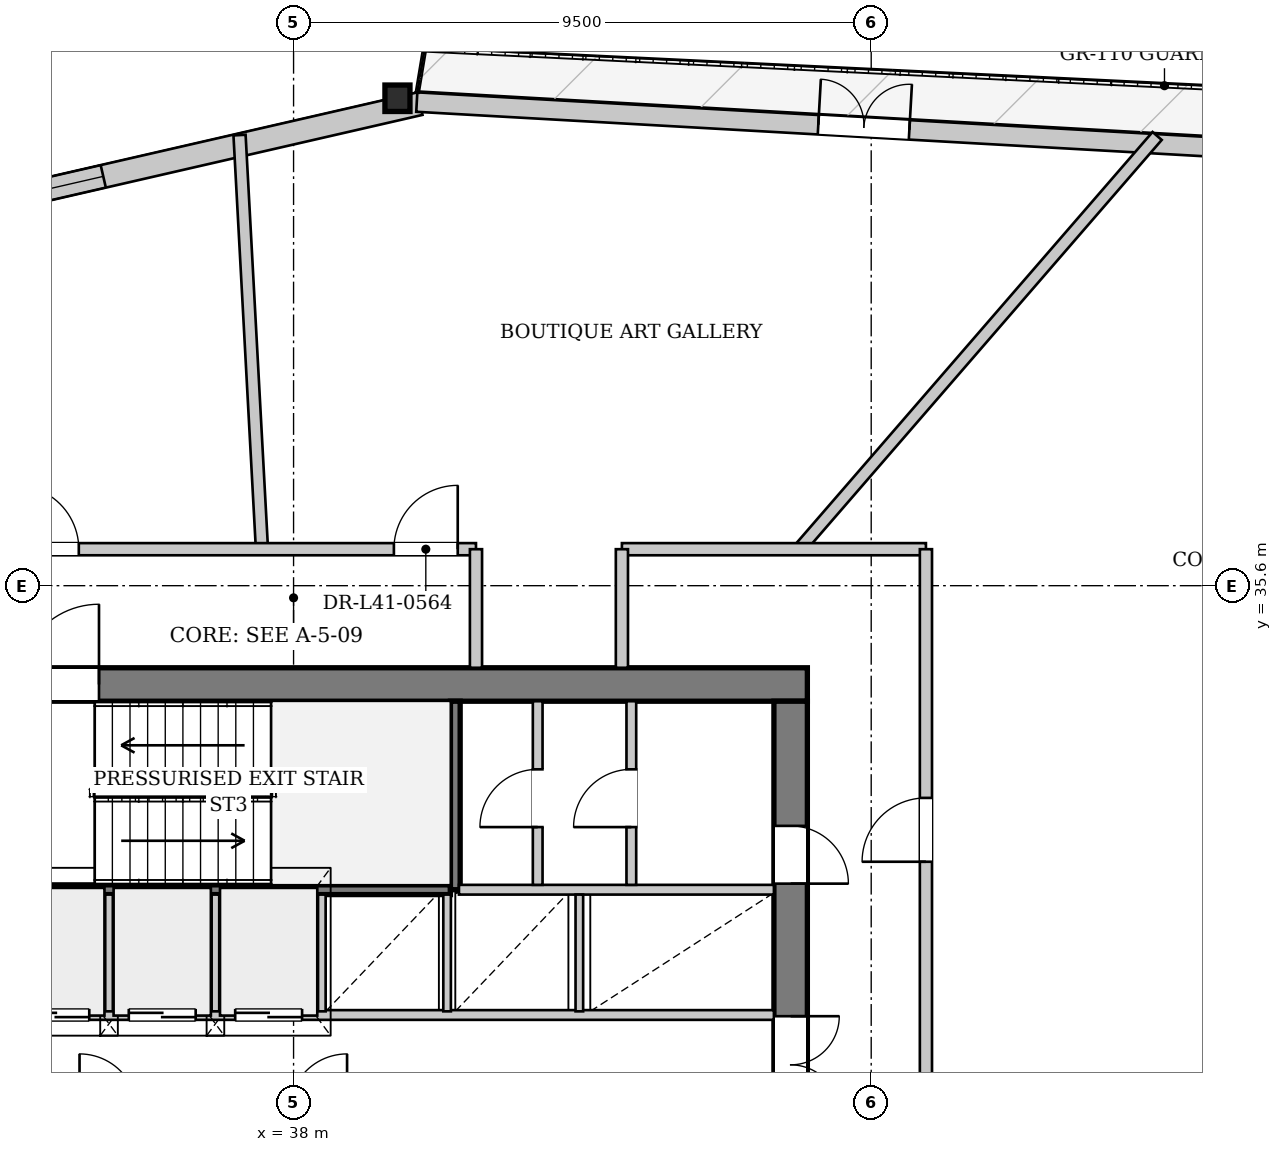
"""IFC4 building model, lengths in metres.
Left out: names, types, materials, properties, quantities, classifications, styles, units other than length and angle.
Written with IfcOpenShell. Run it as: python <this file> out.ifc"""

import sys

from ifc_helpers import new_model, si_unit, direction, frame, frame_2d, origin, origin_2d, place, context, subcontext, project, spatial, rectangle, i_section, extrude, source, transform, mapped, element, fill, save


model = new_model("IFC4")
c1 = context("Model", 3, precision=1e-05, world=origin(), true_north=direction((0.0, 1.0)))
c2 = subcontext(c1, "Body", "Model", "MODEL_VIEW")
j1 = project(units=[si_unit("LENGTHUNIT", "METRE"), si_unit("PLANEANGLEUNIT", "RADIAN")], contexts=[c1])
p1 = place(None, origin())
s1 = spatial("IfcSite", under=j1, at=p1, CompositionType="ELEMENT")
p2 = place(p1, origin())
s2 = spatial("IfcBuilding", under=s1, at=p2, CompositionType="ELEMENT")
p3 = place(p2, frame((0.0, 0.0, 157.25)))
s3 = spatial("IfcBuildingStorey", under=s2, at=p3, CompositionType="ELEMENT", Elevation=157.25)
m1 = source(origin(), c2, "Body", "SweptSolid", [
    extrude(i_section(OverallWidth=0.412, OverallDepth=0.435, WebThickness=0.031, FlangeThickness=0.05, at=origin_2d()), origin(), (0.0, 0.0, 1.0), 3.453),
])
p4 = place(p3, frame((40.035, 43.713, 0.0), z_axis=(-0.189343347232, -0.056209096733, 0.980300787668), x_axis=(0.284588007849, -0.958649918264, 0.0)))
e1 = element("IfcColumn", 1, at=p4, inside=s3, PredefinedType="COLUMN", context=c2, shape_type="MappedRepresentation", body=[
    mapped(m1, transform((0.0, 0.0, 0.0), x_axis=(1.0, 0.0, 0.0), y_axis=(0.0, 1.0, 0.0), z_axis=(0.0, 0.0, 1.0), scale=1.0)),
])
p5 = place(p3, frame((17.649, 38.375, 0.0), z_axis=(0.0, 0.0, 1.0), x_axis=(0.974613320318, 0.223894787475, 0.0)))
e2 = element("IfcWall", 2, at=p5, inside=s3, PredefinedType="SOLIDWALL", context=c2, shape_type="SweptSolid", body=[
    extrude(rectangle(XDim=23.013, YDim=0.38, at=frame_2d((11.507, 0.0))), origin(), (0.0, 0.0, 1.0), 2.722),
])
p6 = place(p5, frame((5.344, 0.0, 0.352)))
e3 = element("IfcOpeningElement", 3, at=p6, cuts=e2, PredefinedType="OPENING", context=c2, shape_type="SweptSolid", body=[
    extrude(rectangle(XDim=2.2, YDim=2.25, at=frame_2d((1.1, 1.125))), frame((0.0, 0.2, 0.0), z_axis=(0.0, -1.0, 0.0), x_axis=(1.0, 0.0, 0.0)), (0.0, 0.0, 1.0), 0.4),
])
p7 = place(p5, frame((15.47, 0.0, 0.352)))
e4 = element("IfcOpeningElement", 4, at=p7, cuts=e2, PredefinedType="OPENING", context=c2, shape_type="SweptSolid", body=[
    extrude(rectangle(XDim=2.2, YDim=2.25, at=frame_2d((1.1, 1.125))), frame((0.0, 0.2, 0.0), z_axis=(0.0, -1.0, 0.0), x_axis=(1.0, 0.0, 0.0)), (0.0, 0.0, 1.0), 0.4),
])
p8 = place(p3, frame((40.027, 43.553, 0.0), z_axis=(0.0, 0.0, 1.0), x_axis=(0.998410901797, -0.056353093731, 0.0)))
e5 = element("IfcWall", 5, at=p8, inside=s3, PredefinedType="SOLIDWALL", context=c2, shape_type="SweptSolid", body=[
    extrude(rectangle(XDim=23.013, YDim=0.32, at=frame_2d((11.507, 0.0))), origin(), (0.0, 0.0, 1.0), 2.722),
])
p9 = place(p8, frame((6.614, 0.0, 0.0)))
e6 = element("IfcOpeningElement", 6, at=p9, cuts=e5, PredefinedType="OPENING", context=c2, shape_type="SweptSolid", body=[
    extrude(rectangle(XDim=1.5, YDim=2.3, at=frame_2d((0.75, 1.15))), frame((0.0, 0.17, 0.0), z_axis=(0.0, -1.0, 0.0), x_axis=(1.0, 0.0, 0.0)), (0.0, 0.0, 1.0), 0.34),
])
p10 = place(p8, frame((15.73, 0.0, 0.252)))
e7 = element("IfcOpeningElement", 7, at=p10, cuts=e5, PredefinedType="OPENING", context=c2, shape_type="SweptSolid", body=[
    extrude(rectangle(XDim=2.6, YDim=2.35, at=frame_2d((1.3, 1.175))), frame((0.0, 0.17, 0.0), z_axis=(0.0, -1.0, 0.0), x_axis=(1.0, 0.0, 0.0)), (0.0, 0.0, 1.0), 0.34),
])
p11 = place(p3, frame((64.549, 39.384, 0.0), z_axis=(0.0, 0.0, 1.0), x_axis=(-0.49798956696, -0.867183020589, 0.0)))
e8 = element("IfcWall", 8, at=p11, inside=s3, PredefinedType="SOLIDWALL", context=c2, shape_type="SweptSolid", body=[
    extrude(rectangle(XDim=23.598, YDim=0.38, at=frame_2d((11.799, 0.0))), origin(), (0.0, 0.0, 1.0), 2.722),
])
p12 = place(p11, frame((5.507, 0.0, 0.352)))
e9 = element("IfcOpeningElement", 9, at=p12, cuts=e8, PredefinedType="OPENING", context=c2, shape_type="SweptSolid", body=[
    extrude(rectangle(XDim=2.2, YDim=2.25, at=frame_2d((1.1, 1.125))), frame((0.0, 0.2, 0.0), z_axis=(0.0, -1.0, 0.0), x_axis=(1.0, 0.0, 0.0)), (0.0, 0.0, 1.0), 0.4),
])
p13 = place(p11, frame((15.891, 0.0, 0.352)))
e10 = element("IfcOpeningElement", 10, at=p13, cuts=e8, PredefinedType="OPENING", context=c2, shape_type="SweptSolid", body=[
    extrude(rectangle(XDim=2.2, YDim=2.25, at=frame_2d((1.1, 1.125))), frame((0.0, 0.2, 0.0), z_axis=(0.0, -1.0, 0.0), x_axis=(1.0, 0.0, 0.0)), (0.0, 0.0, 1.0), 0.4),
])
p14 = place(p3, frame((29.55, 33.975, 0.0), z_axis=(0.0, 0.0, 1.0), x_axis=(1.0, 0.0, 0.0)))
e11 = element("IfcWall", 11, at=p14, inside=s3, PredefinedType="SHEAR", context=c2, shape_type="SweptSolid", body=[
    extrude(rectangle(XDim=16.9, YDim=0.55, at=frame_2d((8.45, 0.0))), origin(), (0.0, 0.0, 1.0), 3.33),
])
p15 = place(p14, frame((1.55, 0.0, 0.0)))
e12 = element("IfcOpeningElement", 12, at=p15, cuts=e11, PredefinedType="OPENING", context=c2, shape_type="SweptSolid", body=[
    extrude(rectangle(XDim=0.95, YDim=2.1, at=frame_2d((0.475, 1.05))), frame((0.0, 0.285, 0.0), z_axis=(0.0, -1.0, 0.0), x_axis=(1.0, 0.0, 0.0)), (0.0, 0.0, 1.0), 0.57),
])
p16 = place(p14, frame((3.93, 0.0, 0.0)))
e13 = element("IfcOpeningElement", 13, at=p16, cuts=e11, PredefinedType="OPENING", context=c2, shape_type="SweptSolid", body=[
    extrude(rectangle(XDim=1.32, YDim=2.2, at=frame_2d((0.66, 1.1))), frame((0.0, 0.285, 0.0), z_axis=(0.0, -1.0, 0.0), x_axis=(1.0, 0.0, 0.0)), (0.0, 0.0, 1.0), 0.57),
])
p17 = place(p3, frame((46.175, 33.7, 0.0), z_axis=(0.0, 0.0, 1.0), x_axis=(0.0, -1.0, 0.0)))
e14 = element("IfcWall", 14, at=p17, inside=s3, PredefinedType="SHEAR", context=c2, shape_type="SweptSolid", body=[
    extrude(rectangle(XDim=14.2, YDim=0.55, at=frame_2d((7.1, 0.0))), origin(), (0.0, 0.0, 1.0), 3.33),
])
p18 = place(p17, frame((5.18, 0.0, 0.0)))
e15 = element("IfcOpeningElement", 15, at=p18, cuts=e14, PredefinedType="OPENING", context=c2, shape_type="SweptSolid", body=[
    extrude(rectangle(XDim=1.6, YDim=2.2, at=frame_2d((0.8, 1.1))), frame((0.0, 0.285, 0.0), z_axis=(0.0, -1.0, 0.0), x_axis=(1.0, 0.0, 0.0)), (0.0, 0.0, 1.0), 0.57),
])
p19 = place(p17, frame((2.05, 0.0, 0.0)))
e16 = element("IfcOpeningElement", 16, at=p19, cuts=e14, PredefinedType="OPENING", context=c2, shape_type="SweptSolid", body=[
    extrude(rectangle(XDim=0.95, YDim=2.1, at=frame_2d((0.475, 1.05))), frame((0.0, 0.285, 0.0), z_axis=(0.0, -1.0, 0.0), x_axis=(1.0, 0.0, 0.0)), (0.0, 0.0, 1.0), 0.57),
])
p20 = place(p3, frame((33.28, 30.6, 0.0), z_axis=(0.0, 0.0, 1.0), x_axis=(1.0, 0.0, 0.0)))
e17 = element("IfcWall", 17, at=p20, inside=s3, PredefinedType="PARTITIONING", context=c2, shape_type="SweptSolid", body=[
    extrude(rectangle(XDim=7.3, YDim=0.16, at=frame_2d((3.65, 0.0))), origin(), (0.0, 0.0, 1.0), 3.33),
])
p21 = place(p3, frame((40.66, 30.6, 0.0), z_axis=(0.0, 0.0, 1.0), x_axis=(0.0, 1.0, 0.0)))
e18 = element("IfcWall", 18, at=p21, inside=s3, PredefinedType="PARTITIONING", context=c2, shape_type="SweptSolid", body=[
    extrude(rectangle(XDim=3.1, YDim=0.16, at=frame_2d((1.55, 0.0))), origin(), (0.0, 0.0, 1.0), 3.33),
])
p22 = place(p3, frame((33.28, 28.54, 0.0), z_axis=(0.0, 0.0, 1.0), x_axis=(1.0, 0.0, 0.0)))
e19 = element("IfcWall", 19, at=p22, inside=s3, PredefinedType="PARTITIONING", context=c2, shape_type="SweptSolid", body=[
    extrude(rectangle(XDim=12.62, YDim=0.16, at=frame_2d((6.31, 0.0))), origin(), (0.0, 0.0, 1.0), 3.33),
])
p23 = place(p22, frame((0.26, 0.0, 0.0)))
e20 = element("IfcOpeningElement", 20, at=p23, cuts=e19, PredefinedType="OPENING", context=c2, shape_type="SweptSolid", body=[
    extrude(rectangle(XDim=1.1, YDim=2.2, at=frame_2d((0.55, 1.1))), frame((0.0, 0.09, 0.0), z_axis=(0.0, -1.0, 0.0), x_axis=(1.0, 0.0, 0.0)), (0.0, 0.0, 1.0), 0.18),
])
p24 = place(p22, frame((2.01, 0.0, 0.0)))
e21 = element("IfcOpeningElement", 21, at=p24, cuts=e19, PredefinedType="OPENING", context=c2, shape_type="SweptSolid", body=[
    extrude(rectangle(XDim=1.1, YDim=2.2, at=frame_2d((0.55, 1.1))), frame((0.0, 0.09, 0.0), z_axis=(0.0, -1.0, 0.0), x_axis=(1.0, 0.0, 0.0)), (0.0, 0.0, 1.0), 0.18),
])
p25 = place(p22, frame((3.76, 0.0, 0.0)))
e22 = element("IfcOpeningElement", 22, at=p25, cuts=e19, PredefinedType="OPENING", context=c2, shape_type="SweptSolid", body=[
    extrude(rectangle(XDim=1.1, YDim=2.2, at=frame_2d((0.55, 1.1))), frame((0.0, 0.09, 0.0), z_axis=(0.0, -1.0, 0.0), x_axis=(1.0, 0.0, 0.0)), (0.0, 0.0, 1.0), 0.18),
])
p26 = place(p3, frame((40.72, 30.6, 0.0), z_axis=(0.0, 0.0, 1.0), x_axis=(1.0, 0.0, 0.0)))
e23 = element("IfcWall", 23, at=p26, inside=s3, PredefinedType="PARTITIONING", context=c2, shape_type="SweptSolid", body=[
    extrude(rectangle(XDim=5.18, YDim=0.16, at=frame_2d((2.59, 0.0))), origin(), (0.0, 0.0, 1.0), 3.33),
])
for number, where, z_axis, x_axis in (
    (24, (34.965, 28.6, 0.0), (0.0, 0.0, 1.0), (0.0, 1.0, 0.0)),
    (25, (36.715, 28.6, 0.0), (0.0, 0.0, 1.0), (0.0, 1.0, 0.0)),
    (26, (38.465, 28.6, 0.0), (0.0, 0.0, 1.0), (0.0, 1.0, 0.0)),
    (27, (40.525, 28.6, 0.0), (0.0, 0.0, 1.0), (0.0, 1.0, 0.0)),
    (28, (42.7, 28.6, 0.0), (0.0, 0.0, 1.0), (0.0, 1.0, 0.0)),
):
    element("IfcWall", number, at=place(p3, frame(where, z_axis=z_axis, x_axis=x_axis)), inside=s3, PredefinedType="PARTITIONING", context=c2, shape_type="SweptSolid", body=[
        extrude(rectangle(XDim=1.92, YDim=0.125, at=frame_2d((0.96, 0.0))), origin(), (0.0, 0.0, 1.0), 3.33),
    ])
p27 = place(p3, frame((42.015, 30.68, 0.0), z_axis=(0.0, 0.0, 1.0), x_axis=(0.0, 1.0, 0.0)))
e29 = element("IfcWall", 29, at=p27, inside=s3, PredefinedType="PARTITIONING", context=c2, shape_type="SweptSolid", body=[
    extrude(rectangle(XDim=3.02, YDim=0.16, at=frame_2d((1.51, 0.0))), origin(), (0.0, 0.0, 1.0), 3.33),
])
p28 = place(p27, frame((0.95, 0.0, 0.0)))
e30 = element("IfcOpeningElement", 30, at=p28, cuts=e29, PredefinedType="OPENING", context=c2, shape_type="SweptSolid", body=[
    extrude(rectangle(XDim=0.95, YDim=2.1, at=frame_2d((0.475, 1.05))), frame((0.0, 0.09, 0.0), z_axis=(0.0, -1.0, 0.0), x_axis=(1.0, 0.0, 0.0)), (0.0, 0.0, 1.0), 0.18),
])
p29 = place(p3, frame((43.555, 30.68, 0.0), z_axis=(0.0, 0.0, 1.0), x_axis=(0.0, 1.0, 0.0)))
e31 = element("IfcWall", 31, at=p29, inside=s3, PredefinedType="PARTITIONING", context=c2, shape_type="SweptSolid", body=[
    extrude(rectangle(XDim=3.02, YDim=0.16, at=frame_2d((1.51, 0.0))), origin(), (0.0, 0.0, 1.0), 3.33),
])
p30 = place(p29, frame((0.95, 0.0, 0.0)))
e32 = element("IfcOpeningElement", 32, at=p30, cuts=e31, PredefinedType="OPENING", context=c2, shape_type="SweptSolid", body=[
    extrude(rectangle(XDim=0.95, YDim=2.1, at=frame_2d((0.475, 1.05))), frame((0.0, 0.09, 0.0), z_axis=(0.0, -1.0, 0.0), x_axis=(1.0, 0.0, 0.0)), (0.0, 0.0, 1.0), 0.18),
])
p31 = place(p3, frame((46.316, 36.2, 0.0), z_axis=(0.0, 0.0, 1.0), x_axis=(0.654736166115, 0.755857495022, 0.0)))
e33 = element("IfcWall", 33, at=p31, inside=s3, PredefinedType="PARTITIONING", context=c2, shape_type="SweptSolid", body=[
    extrude(rectangle(XDim=8.991, YDim=0.2, at=frame_2d((4.496, 0.0))), origin(), (0.0, 0.0, 1.0), 3.33),
])
p32 = place(p3, frame((37.48, 36.2, 0.0), z_axis=(0.0, 0.0, 1.0), x_axis=(-0.054052429799, 0.998538098839, 0.0)))
e34 = element("IfcWall", 34, at=p32, inside=s3, PredefinedType="PARTITIONING", context=c2, shape_type="SweptSolid", body=[
    extrude(rectangle(XDim=6.82, YDim=0.2, at=frame_2d((3.41, 0.0))), origin(), (0.0, 0.0, 1.0), 3.33),
])
p33 = place(p3, frame((27.6, 36.2, 0.0), z_axis=(0.0, 0.0, 1.0), x_axis=(1.0, 0.0, 0.0)))
e35 = element("IfcWall", 35, at=p33, inside=s3, PredefinedType="PARTITIONING", context=c2, shape_type="SweptSolid", body=[
    extrude(rectangle(XDim=13.4, YDim=0.2, at=frame_2d((6.7, 0.0))), origin(), (0.0, 0.0, 1.0), 3.33),
])
p34 = place(p33, frame((12.05, 0.0, 0.0)))
e36 = element("IfcOpeningElement", 36, at=p34, cuts=e35, PredefinedType="OPENING", context=c2, shape_type="SweptSolid", body=[
    extrude(rectangle(XDim=1.05, YDim=2.2, at=frame_2d((0.525, 1.1))), frame((0.0, 0.11, 0.0), z_axis=(0.0, -1.0, 0.0), x_axis=(1.0, 0.0, 0.0)), (0.0, 0.0, 1.0), 0.22),
])
p35 = place(p33, frame((5.818, 0.0, 0.0)))
e37 = element("IfcOpeningElement", 37, at=p35, cuts=e35, PredefinedType="OPENING", context=c2, shape_type="SweptSolid", body=[
    extrude(rectangle(XDim=1.05, YDim=2.2, at=frame_2d((0.525, 1.1))), frame((0.0, 0.11, 0.0), z_axis=(0.0, -1.0, 0.0), x_axis=(1.0, 0.0, 0.0)), (0.0, 0.0, 1.0), 0.22),
])
p36 = place(p3, frame((41.0, 34.25, 0.0), z_axis=(0.0, 0.0, 1.0), x_axis=(0.0, 1.0, 0.0)))
e38 = element("IfcWall", 38, at=p36, inside=s3, PredefinedType="PARTITIONING", context=c2, shape_type="SweptSolid", body=[
    extrude(rectangle(XDim=1.95, YDim=0.2, at=frame_2d((0.975, 0.0))), origin(), (0.0, 0.0, 1.0), 3.33),
])
p37 = place(p3, frame((43.4, 36.2, 0.0), z_axis=(0.0, 0.0, 1.0), x_axis=(1.0, 0.0, 0.0)))
e39 = element("IfcWall", 39, at=p37, inside=s3, PredefinedType="PARTITIONING", context=c2, shape_type="SweptSolid", body=[
    extrude(rectangle(XDim=5.0, YDim=0.2, at=frame_2d((2.5, 0.0))), origin(), (0.0, 0.0, 1.0), 3.33),
])
p38 = place(p3, frame((43.4, 34.25, 0.0), z_axis=(0.0, 0.0, 1.0), x_axis=(0.0, 1.0, 0.0)))
e40 = element("IfcWall", 40, at=p38, inside=s3, PredefinedType="PARTITIONING", context=c2, shape_type="SweptSolid", body=[
    extrude(rectangle(XDim=1.95, YDim=0.2, at=frame_2d((0.975, 0.0))), origin(), (0.0, 0.0, 1.0), 3.33),
])
p39 = place(p3, frame((48.4, 17.0, 0.0), z_axis=(0.0, 0.0, 1.0), x_axis=(0.0, 1.0, 0.0)))
e41 = element("IfcWall", 41, at=p39, inside=s3, PredefinedType="PARTITIONING", context=c2, shape_type="SweptSolid", body=[
    extrude(rectangle(XDim=19.2, YDim=0.2, at=frame_2d((9.6, 0.0))), origin(), (0.0, 0.0, 1.0), 3.33),
])
p40 = place(p39, frame((3.765, 0.0, 0.0)))
e42 = element("IfcOpeningElement", 42, at=p40, cuts=e41, PredefinedType="OPENING", context=c2, shape_type="SweptSolid", body=[
    extrude(rectangle(XDim=1.05, YDim=2.2, at=frame_2d((0.525, 1.1))), frame((0.0, 0.11, 0.0), z_axis=(0.0, -1.0, 0.0), x_axis=(1.0, 0.0, 0.0)), (0.0, 0.0, 1.0), 0.22),
])
p41 = place(p39, frame((14.06, 0.0, 0.0)))
e43 = element("IfcOpeningElement", 43, at=p41, cuts=e41, PredefinedType="OPENING", context=c2, shape_type="SweptSolid", body=[
    extrude(rectangle(XDim=1.05, YDim=2.2, at=frame_2d((0.525, 1.1))), frame((0.0, 0.11, 0.0), z_axis=(0.0, -1.0, 0.0), x_axis=(1.0, 0.0, 0.0)), (0.0, 0.0, 1.0), 0.22),
])
m2 = source(origin(), c2, "Body", "SweptSolid", [
    extrude(rectangle(XDim=2.2, YDim=2.25, at=frame_2d((1.1, 1.125))), frame((0.0, 0.03, 0.0), z_axis=(0.0, -1.0, 0.0), x_axis=(1.0, 0.0, 0.0)), (0.0, 0.0, 1.0), 0.06),
])
p42 = place(p7, origin())
e44 = element("IfcWindow", 44, at=p42, inside=s3, PartitioningType="SINGLE_PANEL", PredefinedType="WINDOW", context=c2, shape_type="MappedRepresentation", body=[
    mapped(m2, transform((0.0, 0.0, 0.0), x_axis=(1.0, 0.0, 0.0), y_axis=(0.0, 1.0, 0.0), z_axis=(0.0, 0.0, 1.0), scale=1.0)),
])
fill(e4, e44)
m3 = source(origin(), c2, "Body", "SweptSolid", [
    extrude(rectangle(XDim=1.5, YDim=2.3, at=frame_2d((0.75, 1.15))), frame((0.0, 0.025, 0.0), z_axis=(0.0, -1.0, 0.0), x_axis=(1.0, 0.0, 0.0)), (0.0, 0.0, 1.0), 0.05),
])
p43 = place(p9, origin())
e45 = element("IfcDoor", 45, at=p43, inside=s3, OperationType="DOUBLE_DOOR_SINGLE_SWING", PredefinedType="DOOR", context=c2, shape_type="MappedRepresentation", body=[
    mapped(m3, transform((0.0, 0.0, 0.0), x_axis=(1.0, 0.0, 0.0), y_axis=(0.0, 1.0, 0.0), z_axis=(0.0, 0.0, 1.0), scale=1.0)),
])
fill(e6, e45)
m4 = source(origin(), c2, "Body", "SweptSolid", [
    extrude(rectangle(XDim=1.32, YDim=2.2, at=frame_2d((0.66, 1.1))), frame((0.0, 0.025, 0.0), z_axis=(0.0, -1.0, 0.0), x_axis=(1.0, 0.0, 0.0)), (0.0, 0.0, 1.0), 0.05),
])
p44 = place(p16, origin())
e46 = element("IfcDoor", 46, at=p44, inside=s3, OperationType="SINGLE_SWING_RIGHT", PredefinedType="DOOR", context=c2, shape_type="MappedRepresentation", body=[
    mapped(m4, transform((0.0, 0.0, 0.0), x_axis=(1.0, 0.0, 0.0), y_axis=(0.0, 1.0, 0.0), z_axis=(0.0, 0.0, 1.0), scale=1.0)),
])
fill(e13, e46)
m5 = source(origin(), c2, "Body", "SweptSolid", [
    extrude(rectangle(XDim=1.6, YDim=2.2, at=frame_2d((0.8, 1.1))), frame((0.0, 0.025, 0.0), z_axis=(0.0, -1.0, 0.0), x_axis=(1.0, 0.0, 0.0)), (0.0, 0.0, 1.0), 0.05),
])
p45 = place(p18, origin())
e47 = element("IfcDoor", 47, at=p45, inside=s3, OperationType="DOUBLE_DOOR_SINGLE_SWING", PredefinedType="DOOR", context=c2, shape_type="MappedRepresentation", body=[
    mapped(m5, transform((0.0, 0.0, 0.0), x_axis=(1.0, 0.0, 0.0), y_axis=(0.0, 1.0, 0.0), z_axis=(0.0, 0.0, 1.0), scale=1.0)),
])
fill(e15, e47)
m6 = source(origin(), c2, "Body", "SweptSolid", [
    extrude(rectangle(XDim=1.1, YDim=2.2, at=frame_2d((0.55, 1.1))), frame((0.0, 0.025, 0.0), z_axis=(0.0, -1.0, 0.0), x_axis=(1.0, 0.0, 0.0)), (0.0, 0.0, 1.0), 0.05),
])
p46 = place(p23, origin())
e48 = element("IfcDoor", 48, at=p46, inside=s3, OperationType="DOUBLE_DOOR_SLIDING", PredefinedType="DOOR", context=c2, shape_type="MappedRepresentation", body=[
    mapped(m6, transform((0.0, 0.0, 0.0), x_axis=(1.0, 0.0, 0.0), y_axis=(0.0, 1.0, 0.0), z_axis=(0.0, 0.0, 1.0), scale=1.0)),
])
fill(e20, e48)
p47 = place(p24, origin())
e49 = element("IfcDoor", 49, at=p47, inside=s3, OperationType="DOUBLE_DOOR_SLIDING", PredefinedType="DOOR", context=c2, shape_type="MappedRepresentation", body=[
    mapped(m6, transform((0.0, 0.0, 0.0), x_axis=(1.0, 0.0, 0.0), y_axis=(0.0, 1.0, 0.0), z_axis=(0.0, 0.0, 1.0), scale=1.0)),
])
fill(e21, e49)
p48 = place(p25, origin())
e50 = element("IfcDoor", 50, at=p48, inside=s3, OperationType="DOUBLE_DOOR_SLIDING", PredefinedType="DOOR", context=c2, shape_type="MappedRepresentation", body=[
    mapped(m6, transform((0.0, 0.0, 0.0), x_axis=(1.0, 0.0, 0.0), y_axis=(0.0, 1.0, 0.0), z_axis=(0.0, 0.0, 1.0), scale=1.0)),
])
fill(e22, e50)
m7 = source(origin(), c2, "Body", "SweptSolid", [
    extrude(rectangle(XDim=0.95, YDim=2.1, at=frame_2d((0.475, 1.05))), frame((0.0, 0.025, 0.0), z_axis=(0.0, -1.0, 0.0), x_axis=(1.0, 0.0, 0.0)), (0.0, 0.0, 1.0), 0.05),
])
p49 = place(p28, origin())
e51 = element("IfcDoor", 51, at=p49, inside=s3, OperationType="SINGLE_SWING_LEFT", PredefinedType="DOOR", context=c2, shape_type="MappedRepresentation", body=[
    mapped(m7, transform((0.0, 0.0, 0.0), x_axis=(1.0, 0.0, 0.0), y_axis=(0.0, 1.0, 0.0), z_axis=(0.0, 0.0, 1.0), scale=1.0)),
])
fill(e30, e51)
p50 = place(p30, origin())
e52 = element("IfcDoor", 52, at=p50, inside=s3, OperationType="SINGLE_SWING_LEFT", PredefinedType="DOOR", context=c2, shape_type="MappedRepresentation", body=[
    mapped(m7, transform((0.0, 0.0, 0.0), x_axis=(1.0, 0.0, 0.0), y_axis=(0.0, 1.0, 0.0), z_axis=(0.0, 0.0, 1.0), scale=1.0)),
])
fill(e32, e52)
p51 = place(p19, origin())
e53 = element("IfcDoor", 53, at=p51, inside=s3, OperationType="SINGLE_SWING_RIGHT", PredefinedType="DOOR", context=c2, shape_type="MappedRepresentation", body=[
    mapped(m7, transform((0.0, 0.0, 0.0), x_axis=(1.0, 0.0, 0.0), y_axis=(0.0, 1.0, 0.0), z_axis=(0.0, 0.0, 1.0), scale=1.0)),
])
fill(e16, e53)
m8 = source(origin(), c2, "Body", "SweptSolid", [
    extrude(rectangle(XDim=1.05, YDim=2.2, at=frame_2d((0.525, 1.1))), frame((0.0, 0.025, 0.0), z_axis=(0.0, -1.0, 0.0), x_axis=(1.0, 0.0, 0.0)), (0.0, 0.0, 1.0), 0.05),
])
p52 = place(p34, origin())
e54 = element("IfcDoor", 54, at=p52, inside=s3, OperationType="SINGLE_SWING_RIGHT", PredefinedType="DOOR", context=c2, shape_type="MappedRepresentation", body=[
    mapped(m8, transform((0.0, 0.0, 0.0), x_axis=(1.0, 0.0, 0.0), y_axis=(0.0, 1.0, 0.0), z_axis=(0.0, 0.0, 1.0), scale=1.0)),
])
fill(e36, e54)
p53 = place(p35, origin())
e55 = element("IfcDoor", 55, at=p53, inside=s3, OperationType="SINGLE_SWING_LEFT", PredefinedType="DOOR", context=c2, shape_type="MappedRepresentation", body=[
    mapped(m8, transform((0.0, 0.0, 0.0), x_axis=(1.0, 0.0, 0.0), y_axis=(0.0, 1.0, 0.0), z_axis=(0.0, 0.0, 1.0), scale=1.0)),
])
fill(e37, e55)
p54 = place(p41, origin())
e56 = element("IfcDoor", 56, at=p54, inside=s3, OperationType="SINGLE_SWING_LEFT", PredefinedType="DOOR", context=c2, shape_type="MappedRepresentation", body=[
    mapped(m8, transform((0.0, 0.0, 0.0), x_axis=(1.0, 0.0, 0.0), y_axis=(0.0, 1.0, 0.0), z_axis=(0.0, 0.0, 1.0), scale=1.0)),
])
fill(e43, e56)
save(model, sys.argv[1])
